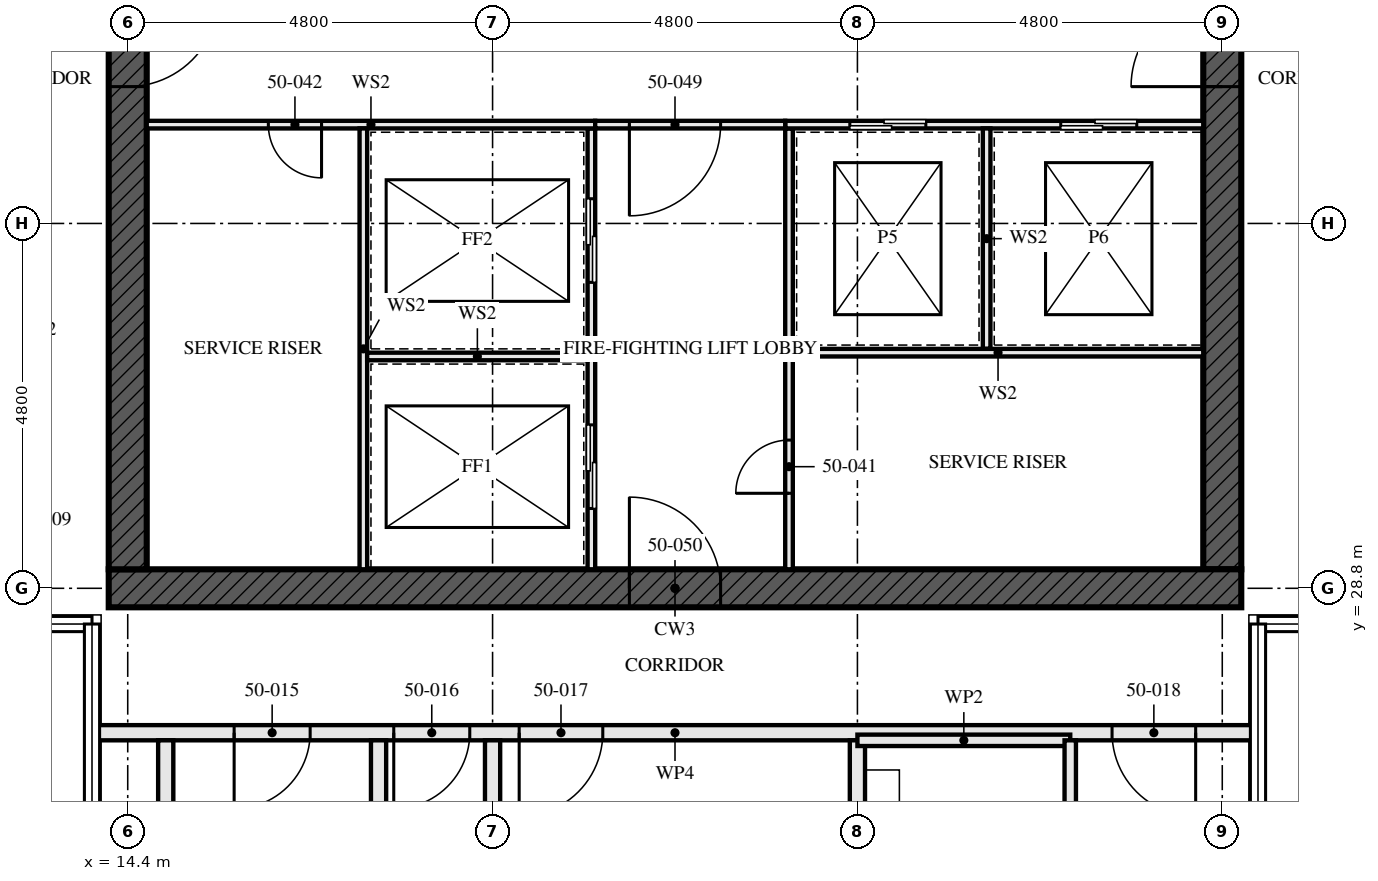
"""IFC4 building model, lengths in metres.
Left out: names, types, materials, properties, quantities, classifications, styles, units other than length and angle.
Written with IfcOpenShell. Run it as: python <this file> out.ifc"""

import sys

from ifc_helpers import new_model, si_unit, direction, frame, frame_2d, origin, place, context, subcontext, project, spatial, rectangle, extrude, element, fill, save


model = new_model("IFC4")
c1 = context("Model", 3, precision=1e-05, world=origin(), true_north=direction((0.0, 1.0)))
c2 = subcontext(c1, "Body", "Model", "MODEL_VIEW")
j1 = project(units=[si_unit("LENGTHUNIT", "METRE"), si_unit("PLANEANGLEUNIT", "RADIAN")], contexts=[c1])
p1 = place(None, origin())
s1 = spatial("IfcSite", under=j1, at=p1, CompositionType="ELEMENT")
p2 = place(p1, origin())
s2 = spatial("IfcBuilding", under=s1, at=p2, CompositionType="ELEMENT")
p3 = place(p2, frame((0.0, 0.0, 183.0)))
s3 = spatial("IfcBuildingStorey", under=s2, at=p3, CompositionType="ELEMENT", Elevation=183.0)
p4 = place(p3, frame((14.15, 28.8, -0.17), z_axis=(0.0, 0.0, 1.0), x_axis=(1.0, 0.0, 0.0)))
e1 = element("IfcWall", 1, at=p4, inside=s3, PredefinedType="SHEAR", context=c2, shape_type="SweptSolid", body=[
    extrude(rectangle(XDim=14.9, YDim=0.5, at=frame_2d((7.45, 0.0))), origin(), (0.0, 0.0, 1.0), 3.5),
])
p5 = place(p4, frame((6.85, 0.0, 0.17)))
e2 = element("IfcOpeningElement", 2, at=p5, cuts=e1, PredefinedType="OPENING", context=c2, shape_type="SweptSolid", body=[
    extrude(rectangle(XDim=1.2, YDim=2.1, at=frame_2d((0.6, 1.05))), frame((0.0, 0.26, 0.0), z_axis=(0.0, -1.0, 0.0), x_axis=(1.0, 0.0, 0.0)), (0.0, 0.0, 1.0), 0.521),
])
p6 = place(p3, frame((14.4, 42.95, -0.17), z_axis=(0.0, 0.0, 1.0), x_axis=(0.0, -1.0, 0.0)))
e3 = element("IfcWall", 3, at=p6, inside=s3, PredefinedType="SHEAR", context=c2, shape_type="SweptSolid", body=[
    extrude(rectangle(XDim=13.9, YDim=0.5, at=frame_2d((6.95, 0.0))), origin(), (0.0, 0.0, 1.0), 3.5),
])
p7 = place(p6, frame((6.35, 0.0, 0.17)))
e4 = element("IfcOpeningElement", 4, at=p7, cuts=e3, PredefinedType="OPENING", context=c2, shape_type="SweptSolid", body=[
    extrude(rectangle(XDim=1.2, YDim=2.1, at=frame_2d((0.6, 1.05))), frame((0.0, 0.26, 0.0), z_axis=(0.0, -1.0, 0.0), x_axis=(1.0, 0.0, 0.0)), (0.0, 0.0, 1.0), 0.521),
])
p8 = place(p3, frame((28.8, 29.05, -0.17), z_axis=(0.0, 0.0, 1.0), x_axis=(0.0, 1.0, 0.0)))
e5 = element("IfcWall", 5, at=p8, inside=s3, PredefinedType="SHEAR", context=c2, shape_type="SweptSolid", body=[
    extrude(rectangle(XDim=13.9, YDim=0.5, at=frame_2d((6.95, 0.0))), origin(), (0.0, 0.0, 1.0), 3.5),
])
p9 = place(p8, frame((6.35, 0.0, 0.17)))
e6 = element("IfcOpeningElement", 6, at=p9, cuts=e5, PredefinedType="OPENING", context=c2, shape_type="SweptSolid", body=[
    extrude(rectangle(XDim=1.2, YDim=2.1, at=frame_2d((0.6, 1.05))), frame((0.0, 0.26, 0.0), z_axis=(0.0, -1.0, 0.0), x_axis=(1.0, 0.0, 0.0)), (0.0, 0.0, 1.0), 0.521),
])
for number, where, z_axis, x_axis in (
    (7, (14.9, 22.1, 0.0), (0.0, 0.0, 1.0), (0.0, 1.0, 0.0)),
    (8, (17.7, 22.1, 0.0), (0.0, 0.0, 1.0), (0.0, 1.0, 0.0)),
):
    element("IfcWall", number, at=place(p3, frame(where, z_axis=z_axis, x_axis=x_axis)), inside=s3, PredefinedType="SOLIDWALL", context=c2, shape_type="SweptSolid", body=[
        extrude(rectangle(XDim=4.7, YDim=0.2, at=frame_2d((2.35, 0.0))), origin(), (0.0, 0.0, 1.0), 2.99),
    ])
for number, where, z_axis, x_axis in (
    (9, (19.2, 19.52, 0.0), (0.0, 0.0, 1.0), (0.0, 1.0, 0.0)),
    (10, (24.0, 19.52, 0.0), (0.0, 0.0, 1.0), (0.0, 1.0, 0.0)),
):
    element("IfcWall", number, at=place(p3, frame(where, z_axis=z_axis, x_axis=x_axis)), inside=s3, PredefinedType="PARTITIONING", context=c2, shape_type="SweptSolid", body=[
        extrude(rectangle(XDim=7.28, YDim=0.2, at=frame_2d((3.64, 0.0))), origin(), (0.0, 0.0, 1.0), 2.55),
    ])
p10 = place(p3, frame((26.8, 23.8, 0.0), z_axis=(0.0, 0.0, 1.0), x_axis=(0.0, 1.0, 0.0)))
e11 = element("IfcWall", 11, at=p10, inside=s3, PredefinedType="PARTITIONING", context=c2, shape_type="SweptSolid", body=[
    extrude(rectangle(XDim=3.0, YDim=0.15, at=frame_2d((1.5, 0.0))), origin(), (0.0, 0.0, 1.0), 2.55),
])
p11 = place(p3, frame((24.0, 26.8, 0.0), z_axis=(0.0, 0.0, 1.0), x_axis=(1.0, 0.0, 0.0)))
e12 = element("IfcWall", 12, at=p11, inside=s3, PredefinedType="PARTITIONING", context=c2, shape_type="SweptSolid", body=[
    extrude(rectangle(XDim=2.8, YDim=0.15, at=frame_2d((1.4, 0.0))), origin(), (0.0, 0.0, 1.0), 3.33),
])
p12 = place(p3, frame((13.95, 26.9, 0.0), z_axis=(0.0, 0.0, 1.0), x_axis=(1.0, 0.0, 0.0)))
e13 = element("IfcWall", 13, at=p12, inside=s3, PredefinedType="PARTITIONING", context=c2, shape_type="SweptSolid", body=[
    extrude(rectangle(XDim=15.3, YDim=0.2, at=frame_2d((7.65, 0.0))), origin(), (0.0, 0.0, 1.0), 2.32),
])
p13 = place(p12, frame((1.85, 0.0, 0.0)))
e14 = element("IfcOpeningElement", 14, at=p13, cuts=e13, PredefinedType="OPENING", context=c2, shape_type="SweptSolid", body=[
    extrude(rectangle(XDim=1.0, YDim=2.1, at=frame_2d((0.5, 1.05))), frame((0.0, 0.111, 0.0), z_axis=(0.0, -1.0, 0.0), x_axis=(1.0, 0.0, 0.0)), (0.0, 0.0, 1.0), 0.221),
])
p14 = place(p12, frame((3.95, 0.0, 0.0)))
e15 = element("IfcOpeningElement", 15, at=p14, cuts=e13, PredefinedType="OPENING", context=c2, shape_type="SweptSolid", body=[
    extrude(rectangle(XDim=1.0, YDim=2.1, at=frame_2d((0.5, 1.05))), frame((0.0, 0.111, 0.0), z_axis=(0.0, -1.0, 0.0), x_axis=(1.0, 0.0, 0.0)), (0.0, 0.0, 1.0), 0.221),
])
p15 = place(p12, frame((5.6, 0.0, 0.0)))
e16 = element("IfcOpeningElement", 16, at=p15, cuts=e13, PredefinedType="OPENING", context=c2, shape_type="SweptSolid", body=[
    extrude(rectangle(XDim=1.1, YDim=2.1, at=frame_2d((0.55, 1.05))), frame((0.0, 0.111, 0.0), z_axis=(0.0, -1.0, 0.0), x_axis=(1.0, 0.0, 0.0)), (0.0, 0.0, 1.0), 0.221),
])
p16 = place(p12, frame((13.4, 0.0, 0.0)))
e17 = element("IfcOpeningElement", 17, at=p16, cuts=e13, PredefinedType="OPENING", context=c2, shape_type="SweptSolid", body=[
    extrude(rectangle(XDim=1.1, YDim=2.1, at=frame_2d((0.55, 1.05))), frame((0.0, 0.111, 0.0), z_axis=(0.0, -1.0, 0.0), x_axis=(1.0, 0.0, 0.0)), (0.0, 0.0, 1.0), 0.221),
])
p17 = place(p3, frame((20.5, 29.05, 0.0), z_axis=(0.0, 0.0, 1.0), x_axis=(0.0, 1.0, 0.0)))
e18 = element("IfcWall", 18, at=p17, inside=s3, PredefinedType="SOLIDWALL", context=c2, shape_type="SweptSolid", body=[
    extrude(rectangle(XDim=5.8, YDim=0.1, at=frame_2d((2.9, 0.0))), origin(), (0.0, 0.0, 1.0), 3.33),
])
p18 = place(p17, frame((0.8, 0.0, 0.0)))
e19 = element("IfcOpeningElement", 19, at=p18, cuts=e18, PredefinedType="OPENING", context=c2, shape_type="SweptSolid", body=[
    extrude(rectangle(XDim=1.1, YDim=2.3, at=frame_2d((0.55, 1.15))), frame((0.0, 0.061, 0.0), z_axis=(0.0, -1.0, 0.0), x_axis=(1.0, 0.0, 0.0)), (0.0, 0.0, 1.0), 0.121),
])
p19 = place(p17, frame((3.775, 0.0, 0.0)))
e20 = element("IfcOpeningElement", 20, at=p19, cuts=e18, PredefinedType="OPENING", context=c2, shape_type="SweptSolid", body=[
    extrude(rectangle(XDim=1.1, YDim=2.3, at=frame_2d((0.55, 1.15))), frame((0.0, 0.061, 0.0), z_axis=(0.0, -1.0, 0.0), x_axis=(1.0, 0.0, 0.0)), (0.0, 0.0, 1.0), 0.121),
])
p20 = place(p3, frame((23.1, 29.05, 0.0), z_axis=(0.0, 0.0, 1.0), x_axis=(0.0, 1.0, 0.0)))
e21 = element("IfcWall", 21, at=p20, inside=s3, PredefinedType="SOLIDWALL", context=c2, shape_type="SweptSolid", body=[
    extrude(rectangle(XDim=5.8, YDim=0.1, at=frame_2d((2.9, 0.0))), origin(), (0.0, 0.0, 1.0), 3.33),
])
p21 = place(p20, frame((1.0, 0.0, 0.0)))
e22 = element("IfcOpeningElement", 22, at=p21, cuts=e21, PredefinedType="OPENING", context=c2, shape_type="SweptSolid", body=[
    extrude(rectangle(XDim=0.7, YDim=2.1, at=frame_2d((0.35, 1.05))), frame((0.0, 0.061, 0.0), z_axis=(0.0, -1.0, 0.0), x_axis=(1.0, 0.0, 0.0)), (0.0, 0.0, 1.0), 0.121),
])
p22 = place(p3, frame((14.65, 34.9, 0.0), z_axis=(0.0, 0.0, 1.0), x_axis=(1.0, 0.0, 0.0)))
e23 = element("IfcWall", 23, at=p22, inside=s3, PredefinedType="SOLIDWALL", context=c2, shape_type="SweptSolid", body=[
    extrude(rectangle(XDim=5.9, YDim=0.1, at=frame_2d((2.95, 0.0))), origin(), (0.0, 0.0, 1.0), 3.33),
])
p23 = place(p22, frame((1.6, 0.0, 0.0)))
e24 = element("IfcOpeningElement", 24, at=p23, cuts=e23, PredefinedType="OPENING", context=c2, shape_type="SweptSolid", body=[
    extrude(rectangle(XDim=0.7, YDim=2.1, at=frame_2d((0.35, 1.05))), frame((0.0, 0.061, 0.0), z_axis=(0.0, -1.0, 0.0), x_axis=(1.0, 0.0, 0.0)), (0.0, 0.0, 1.0), 0.121),
])
p24 = place(p3, frame((23.05, 34.9, 0.0), z_axis=(0.0, 0.0, 1.0), x_axis=(1.0, 0.0, 0.0)))
e25 = element("IfcWall", 25, at=p24, inside=s3, PredefinedType="SOLIDWALL", context=c2, shape_type="SweptSolid", body=[
    extrude(rectangle(XDim=5.5, YDim=0.1, at=frame_2d((2.75, 0.0))), origin(), (0.0, 0.0, 1.0), 3.33),
])
p25 = place(p24, frame((0.85, 0.0, 0.0)))
e26 = element("IfcOpeningElement", 26, at=p25, cuts=e25, PredefinedType="OPENING", context=c2, shape_type="SweptSolid", body=[
    extrude(rectangle(XDim=1.0, YDim=2.1, at=frame_2d((0.5, 1.05))), frame((0.0, 0.061, 0.0), z_axis=(0.0, -1.0, 0.0), x_axis=(1.0, 0.0, 0.0)), (0.0, 0.0, 1.0), 0.121),
])
p26 = place(p24, frame((3.625, 0.0, 0.0)))
e27 = element("IfcOpeningElement", 27, at=p26, cuts=e25, PredefinedType="OPENING", context=c2, shape_type="SweptSolid", body=[
    extrude(rectangle(XDim=1.0, YDim=2.1, at=frame_2d((0.5, 1.05))), frame((0.0, 0.061, 0.0), z_axis=(0.0, -1.0, 0.0), x_axis=(1.0, 0.0, 0.0)), (0.0, 0.0, 1.0), 0.121),
])
p27 = place(p3, frame((20.55, 34.9, 0.0), z_axis=(0.0, 0.0, 1.0), x_axis=(1.0, 0.0, 0.0)))
e28 = element("IfcWall", 28, at=p27, inside=s3, PredefinedType="SOLIDWALL", context=c2, shape_type="SweptSolid", body=[
    extrude(rectangle(XDim=2.5, YDim=0.1, at=frame_2d((1.25, 0.0))), origin(), (0.0, 0.0, 1.0), 3.33),
])
p28 = place(p27, frame((0.45, 0.0, 0.0)))
e29 = element("IfcOpeningElement", 29, at=p28, cuts=e28, PredefinedType="OPENING", context=c2, shape_type="SweptSolid", body=[
    extrude(rectangle(XDim=1.2, YDim=2.1, at=frame_2d((0.6, 1.05))), frame((0.0, 0.061, 0.0), z_axis=(0.0, -1.0, 0.0), x_axis=(1.0, 0.0, 0.0)), (0.0, 0.0, 1.0), 0.121),
])
p29 = place(p3, frame((17.5, 29.05, 0.0), z_axis=(0.0, 0.0, 1.0), x_axis=(0.0, 1.0, 0.0)))
e30 = element("IfcWall", 30, at=p29, inside=s3, PredefinedType="SOLIDWALL", context=c2, shape_type="SweptSolid", body=[
    extrude(rectangle(XDim=5.8, YDim=0.1, at=frame_2d((2.9, 0.0))), origin(), (0.0, 0.0, 1.0), 3.33),
])
p30 = place(p3, frame((17.55, 31.85, 0.0), z_axis=(0.0, 0.0, 1.0), x_axis=(1.0, 0.0, 0.0)))
e31 = element("IfcWall", 31, at=p30, inside=s3, PredefinedType="SOLIDWALL", context=c2, shape_type="SweptSolid", body=[
    extrude(rectangle(XDim=2.9, YDim=0.1, at=frame_2d((1.45, 0.0))), origin(), (0.0, 0.0, 1.0), 3.33),
])
p31 = place(p3, frame((25.7, 31.95, 0.0), z_axis=(0.0, 0.0, 1.0), x_axis=(0.0, 1.0, 0.0)))
e32 = element("IfcWall", 32, at=p31, inside=s3, PredefinedType="SOLIDWALL", context=c2, shape_type="SweptSolid", body=[
    extrude(rectangle(XDim=2.9, YDim=0.1, at=frame_2d((1.45, 0.0))), origin(), (0.0, 0.0, 1.0), 3.33),
])
p32 = place(p3, frame((23.15, 31.9, 0.0), z_axis=(0.0, 0.0, 1.0), x_axis=(1.0, 0.0, 0.0)))
e33 = element("IfcWall", 33, at=p32, inside=s3, PredefinedType="SOLIDWALL", context=c2, shape_type="SweptSolid", body=[
    extrude(rectangle(XDim=5.4, YDim=0.1, at=frame_2d((2.7, 0.0))), origin(), (0.0, 0.0, 1.0), 3.33),
])
p33 = place(p13, frame((1.0, 0.0, 0.0), z_axis=(0.0, 0.0, 1.0), x_axis=(-1.0, 0.0, 0.0)))
e34 = element("IfcDoor", 34, at=p33, inside=s3, OperationType="SINGLE_SWING_LEFT", PredefinedType="DOOR", context=c2, shape_type="SweptSolid", body=[
    extrude(rectangle(XDim=1.0, YDim=2.1, at=frame_2d((0.5, 1.05))), frame((0.0, 0.032, 0.0), z_axis=(0.0, -1.0, 0.0), x_axis=(1.0, 0.0, 0.0)), (0.0, 0.0, 1.0), 0.064),
])
fill(e14, e34)
p34 = place(p14, frame((1.0, 0.0, 0.0), z_axis=(0.0, 0.0, 1.0), x_axis=(-1.0, 0.0, 0.0)))
e35 = element("IfcDoor", 35, at=p34, inside=s3, OperationType="SINGLE_SWING_LEFT", PredefinedType="DOOR", context=c2, shape_type="SweptSolid", body=[
    extrude(rectangle(XDim=1.0, YDim=2.1, at=frame_2d((0.5, 1.05))), frame((0.0, 0.027, 0.0), z_axis=(0.0, -1.0, 0.0), x_axis=(1.0, 0.0, 0.0)), (0.0, 0.0, 1.0), 0.054),
])
fill(e15, e35)
p35 = place(p15, frame((1.1, 0.0, 0.0), z_axis=(0.0, 0.0, 1.0), x_axis=(-1.0, 0.0, 0.0)))
e36 = element("IfcDoor", 36, at=p35, inside=s3, OperationType="SINGLE_SWING_LEFT", PredefinedType="DOOR", context=c2, shape_type="SweptSolid", body=[
    extrude(rectangle(XDim=1.1, YDim=2.1, at=frame_2d((0.55, 1.05))), frame((0.0, 0.027, 0.0), z_axis=(0.0, -1.0, 0.0), x_axis=(1.0, 0.0, 0.0)), (0.0, 0.0, 1.0), 0.054),
])
fill(e16, e36)
p36 = place(p16, frame((1.1, 0.0, 0.0), z_axis=(0.0, 0.0, 1.0), x_axis=(-1.0, 0.0, 0.0)))
e37 = element("IfcDoor", 37, at=p36, inside=s3, OperationType="SINGLE_SWING_RIGHT", PredefinedType="DOOR", context=c2, shape_type="SweptSolid", body=[
    extrude(rectangle(XDim=1.1, YDim=2.1, at=frame_2d((0.55, 1.05))), frame((0.0, 0.027, 0.0), z_axis=(0.0, -1.0, 0.0), x_axis=(1.0, 0.0, 0.0)), (0.0, 0.0, 1.0), 0.054),
])
fill(e17, e37)
p37 = place(p18, origin())
e38 = element("IfcDoor", 38, at=p37, inside=s3, OperationType="SLIDING_TO_LEFT", PredefinedType="DOOR", context=c2, shape_type="SweptSolid", body=[
    extrude(rectangle(XDim=1.1, YDim=2.3, at=frame_2d((0.55, 1.15))), frame((0.0, 0.05, 0.0), z_axis=(0.0, -1.0, 0.0), x_axis=(1.0, 0.0, 0.0)), (0.0, 0.0, 1.0), 0.1),
])
fill(e19, e38)
p38 = place(p19, origin())
e39 = element("IfcDoor", 39, at=p38, inside=s3, OperationType="SLIDING_TO_LEFT", PredefinedType="DOOR", context=c2, shape_type="SweptSolid", body=[
    extrude(rectangle(XDim=1.1, YDim=2.3, at=frame_2d((0.55, 1.15))), frame((0.0, 0.05, 0.0), z_axis=(0.0, -1.0, 0.0), x_axis=(1.0, 0.0, 0.0)), (0.0, 0.0, 1.0), 0.1),
])
fill(e20, e39)
p39 = place(p21, origin())
e40 = element("IfcDoor", 40, at=p39, inside=s3, OperationType="SINGLE_SWING_RIGHT", PredefinedType="DOOR", context=c2, shape_type="SweptSolid", body=[
    extrude(rectangle(XDim=0.7, YDim=2.1, at=frame_2d((0.35, 1.05))), frame((0.0, 0.027, 0.0), z_axis=(0.0, -1.0, 0.0), x_axis=(1.0, 0.0, 0.0)), (0.0, 0.0, 1.0), 0.054),
])
fill(e22, e40)
p40 = place(p23, frame((0.7, 0.0, 0.0), z_axis=(0.0, 0.0, 1.0), x_axis=(-1.0, 0.0, 0.0)))
e41 = element("IfcDoor", 41, at=p40, inside=s3, OperationType="SINGLE_SWING_RIGHT", PredefinedType="DOOR", context=c2, shape_type="SweptSolid", body=[
    extrude(rectangle(XDim=0.7, YDim=2.1, at=frame_2d((0.35, 1.05))), frame((0.0, 0.027, 0.0), z_axis=(0.0, -1.0, 0.0), x_axis=(1.0, 0.0, 0.0)), (0.0, 0.0, 1.0), 0.054),
])
fill(e24, e41)
p41 = place(p25, origin())
e42 = element("IfcDoor", 42, at=p41, inside=s3, OperationType="SLIDING_TO_LEFT", PredefinedType="DOOR", context=c2, shape_type="SweptSolid", body=[
    extrude(rectangle(XDim=1.0, YDim=2.1, at=frame_2d((0.5, 1.05))), frame((0.0, 0.05, 0.0), z_axis=(0.0, -1.0, 0.0), x_axis=(1.0, 0.0, 0.0)), (0.0, 0.0, 1.0), 0.1),
])
fill(e26, e42)
p42 = place(p26, origin())
e43 = element("IfcDoor", 43, at=p42, inside=s3, OperationType="SLIDING_TO_LEFT", PredefinedType="DOOR", context=c2, shape_type="SweptSolid", body=[
    extrude(rectangle(XDim=1.0, YDim=2.1, at=frame_2d((0.5, 1.05))), frame((0.0, 0.05, 0.0), z_axis=(0.0, -1.0, 0.0), x_axis=(1.0, 0.0, 0.0)), (0.0, 0.0, 1.0), 0.1),
])
fill(e27, e43)
p43 = place(p28, frame((1.2, 0.0, 0.0), z_axis=(0.0, 0.0, 1.0), x_axis=(-1.0, 0.0, 0.0)))
e44 = element("IfcDoor", 44, at=p43, inside=s3, OperationType="SINGLE_SWING_LEFT", PredefinedType="DOOR", context=c2, shape_type="SweptSolid", body=[
    extrude(rectangle(XDim=1.2, YDim=2.1, at=frame_2d((0.6, 1.05))), frame((0.0, 0.027, 0.0), z_axis=(0.0, -1.0, 0.0), x_axis=(1.0, 0.0, 0.0)), (0.0, 0.0, 1.0), 0.054),
])
fill(e29, e44)
p44 = place(p5, origin())
e45 = element("IfcDoor", 45, at=p44, inside=s3, OperationType="SINGLE_SWING_LEFT", PredefinedType="DOOR", context=c2, shape_type="SweptSolid", body=[
    extrude(rectangle(XDim=1.2, YDim=2.1, at=frame_2d((0.6, 1.05))), frame((0.0, 0.027, 0.0), z_axis=(0.0, -1.0, 0.0), x_axis=(1.0, 0.0, 0.0)), (0.0, 0.0, 1.0), 0.054),
])
fill(e2, e45)
p45 = place(p7, origin())
e46 = element("IfcDoor", 46, at=p45, inside=s3, OperationType="SINGLE_SWING_LEFT", PredefinedType="DOOR", context=c2, shape_type="SweptSolid", body=[
    extrude(rectangle(XDim=1.2, YDim=2.1, at=frame_2d((0.6, 1.05))), frame((0.0, 0.027, 0.0), z_axis=(0.0, -1.0, 0.0), x_axis=(1.0, 0.0, 0.0)), (0.0, 0.0, 1.0), 0.054),
])
fill(e4, e46)
p46 = place(p9, origin())
e47 = element("IfcDoor", 47, at=p46, inside=s3, OperationType="SINGLE_SWING_LEFT", PredefinedType="DOOR", context=c2, shape_type="SweptSolid", body=[
    extrude(rectangle(XDim=1.2, YDim=2.1, at=frame_2d((0.6, 1.05))), frame((0.0, 0.027, 0.0), z_axis=(0.0, -1.0, 0.0), x_axis=(1.0, 0.0, 0.0)), (0.0, 0.0, 1.0), 0.054),
])
fill(e6, e47)
save(model, sys.argv[1])
